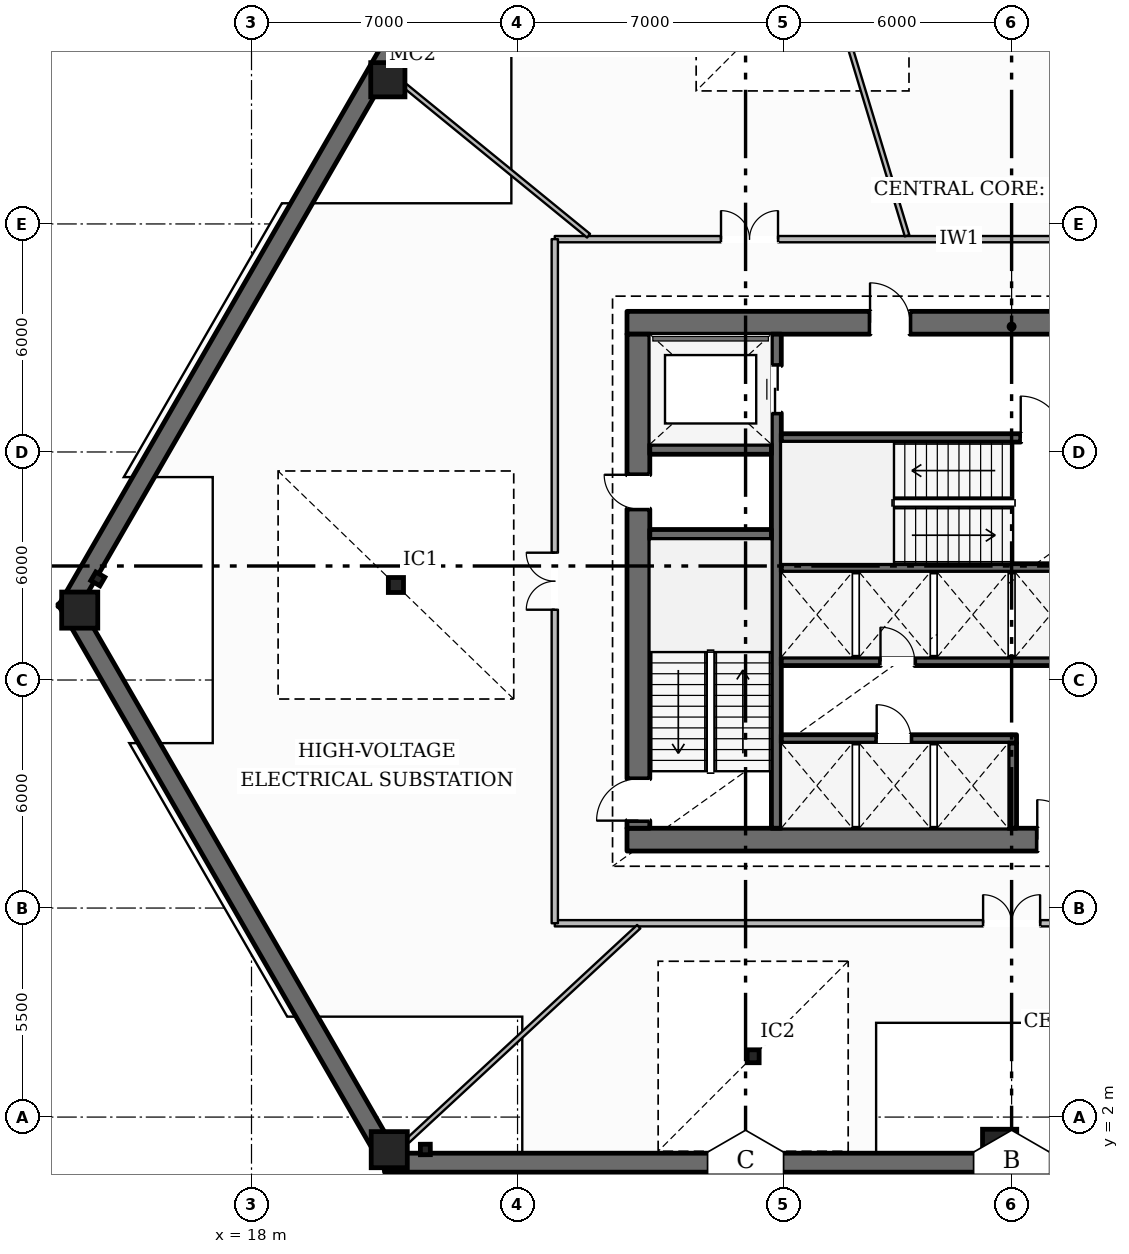
"""IFC4 building model, lengths in metres.
Left out: names, types, materials, properties, quantities, classifications, styles, units other than length and angle.
Written with IfcOpenShell. Run it as: python <this file> out.ifc"""

import sys

from ifc_helpers import new_model, si_unit, direction, frame, frame_2d, origin, origin_2d, place, context, subcontext, project, spatial, rectangle, hollow_rectangle, i_section, extrude, element, fill, save


model = new_model("IFC4")
c1 = context("Model", 3, precision=1e-05, world=origin(), true_north=direction((0.0, 1.0)))
c2 = subcontext(c1, "Body", "Model", "MODEL_VIEW")
j1 = project(units=[si_unit("LENGTHUNIT", "METRE"), si_unit("PLANEANGLEUNIT", "RADIAN")], contexts=[c1])
p1 = place(None, origin())
s1 = spatial("IfcSite", under=j1, at=p1, CompositionType="ELEMENT")
p2 = place(p1, origin())
s2 = spatial("IfcBuilding", under=s1, at=p2, CompositionType="ELEMENT")
p3 = place(p2, frame((0.0, 0.0, -8.4)))
s3 = spatial("IfcBuildingStorey", under=s2, at=p3, CompositionType="ELEMENT", Elevation=-8.4)
p4 = place(p3, frame((29.622, 43.889, 0.0), z_axis=(0.0, 0.0, 1.0), x_axis=(-0.499999749417, -0.866025548458, 0.0)))
e1 = element("IfcWall", 1, at=p4, inside=s3, PredefinedType="SHEAR", context=c2, shape_type="SweptSolid", body=[
    extrude(rectangle(XDim=33.0, YDim=0.5, at=frame_2d((16.5, 0.0))), origin(), (0.0, 0.0, 1.0), 3.95),
])
p5 = place(p3, frame((13.122, 15.618, 0.0), z_axis=(0.0, 0.0, 1.0), x_axis=(0.499998305863, -0.866026381893, 0.0)))
e2 = element("IfcWall", 2, at=p5, inside=s3, PredefinedType="SHEAR", context=c2, shape_type="SweptSolid", body=[
    extrude(rectangle(XDim=17.289, YDim=0.5, at=frame_2d((8.644, 0.0))), origin(), (0.0, 0.0, 1.0), 3.95),
])
p6 = place(p3, frame((21.5, 0.8, 0.0), z_axis=(0.0, 0.0, 1.0), x_axis=(1.0, 0.0, 0.0)))
e3 = element("IfcWall", 3, at=p6, inside=s3, PredefinedType="SHEAR", context=c2, shape_type="SweptSolid", body=[
    extrude(rectangle(XDim=33.0, YDim=0.5, at=frame_2d((16.5, 0.0))), origin(), (0.0, 0.0, 1.0), 3.95),
])
p7 = place(p3, frame((27.88, 9.3, 0.0), z_axis=(0.0, 0.0, 1.0), x_axis=(1.0, 0.0, 0.0)))
e4 = element("IfcWall", 4, at=p7, inside=s3, PredefinedType="SOLIDWALL", context=c2, shape_type="SweptSolid", body=[
    extrude(rectangle(XDim=20.24, YDim=0.6, at=frame_2d((10.12, 0.0))), origin(), (0.0, 0.0, 1.0), 3.95),
])
p8 = place(p7, frame((10.795, 0.0, 0.0)))
e5 = element("IfcOpeningElement", 5, at=p8, cuts=e4, PredefinedType="OPENING", context=c2, shape_type="SweptSolid", body=[
    extrude(rectangle(XDim=1.05, YDim=2.15, at=frame_2d((0.525, 1.075))), frame((0.0, 0.31, 0.0), z_axis=(0.0, -1.0, 0.0), x_axis=(1.0, 0.0, 0.0)), (0.0, 0.0, 1.0), 0.62),
])
p9 = place(p3, frame((27.88, 22.9, 0.0), z_axis=(0.0, 0.0, 1.0), x_axis=(1.0, 0.0, 0.0)))
e6 = element("IfcWall", 6, at=p9, inside=s3, PredefinedType="SOLIDWALL", context=c2, shape_type="SweptSolid", body=[
    extrude(rectangle(XDim=20.24, YDim=0.6, at=frame_2d((10.12, 0.0))), origin(), (0.0, 0.0, 1.0), 3.95),
])
p10 = place(p9, frame((6.395, 0.0, 0.0)))
e7 = element("IfcOpeningElement", 7, at=p10, cuts=e6, PredefinedType="OPENING", context=c2, shape_type="SweptSolid", body=[
    extrude(rectangle(XDim=1.05, YDim=2.15, at=frame_2d((0.525, 1.075))), frame((0.0, 0.31, 0.0), z_axis=(0.0, -1.0, 0.0), x_axis=(1.0, 0.0, 0.0)), (0.0, 0.0, 1.0), 0.62),
])
p11 = place(p9, frame((12.795, 0.0, 0.0)))
e8 = element("IfcOpeningElement", 8, at=p11, cuts=e6, PredefinedType="OPENING", context=c2, shape_type="SweptSolid", body=[
    extrude(rectangle(XDim=1.05, YDim=2.15, at=frame_2d((0.525, 1.075))), frame((0.0, 0.31, 0.0), z_axis=(0.0, -1.0, 0.0), x_axis=(1.0, 0.0, 0.0)), (0.0, 0.0, 1.0), 0.62),
])
p12 = place(p3, frame((28.18, 9.6, 0.0), z_axis=(0.0, 0.0, 1.0), x_axis=(0.0, 1.0, 0.0)))
e9 = element("IfcWall", 9, at=p12, inside=s3, PredefinedType="SOLIDWALL", context=c2, shape_type="SweptSolid", body=[
    extrude(rectangle(XDim=13.0, YDim=0.6, at=frame_2d((6.5, 0.0))), origin(), (0.0, 0.0, 1.0), 3.95),
])
p13 = place(p12, frame((0.2, 0.0, 0.0)))
e10 = element("IfcOpeningElement", 10, at=p13, cuts=e9, PredefinedType="OPENING", context=c2, shape_type="SweptSolid", body=[
    extrude(rectangle(XDim=1.1, YDim=2.15, at=frame_2d((0.55, 1.075))), frame((0.0, 0.31, 0.0), z_axis=(0.0, -1.0, 0.0), x_axis=(1.0, 0.0, 0.0)), (0.0, 0.0, 1.0), 0.62),
])
p14 = place(p12, frame((8.4, 0.0, 0.0)))
e11 = element("IfcOpeningElement", 11, at=p14, cuts=e9, PredefinedType="OPENING", context=c2, shape_type="SweptSolid", body=[
    extrude(rectangle(XDim=0.9, YDim=2.1, at=frame_2d((0.45, 1.05))), frame((0.0, 0.31, 0.0), z_axis=(0.0, -1.0, 0.0), x_axis=(1.0, 0.0, 0.0)), (0.0, 0.0, 1.0), 0.62),
])
p15 = place(p3, frame((31.81, 9.6, 0.0), z_axis=(0.0, 0.0, 1.0), x_axis=(0.0, 1.0, 0.0)))
e12 = element("IfcWall", 12, at=p15, inside=s3, PredefinedType="SHEAR", context=c2, shape_type="SweptSolid", body=[
    extrude(rectangle(XDim=13.0, YDim=0.26, at=frame_2d((6.5, 0.0))), origin(), (0.0, 0.0, 1.0), 3.95),
])
p16 = place(p15, frame((10.925, 0.0, 0.0)))
e13 = element("IfcOpeningElement", 13, at=p16, cuts=e12, PredefinedType="OPENING", context=c2, shape_type="SweptSolid", body=[
    extrude(rectangle(XDim=1.25, YDim=2.25, at=frame_2d((0.625, 1.125))), frame((0.0, 0.14, 0.0), z_axis=(0.0, -1.0, 0.0), x_axis=(1.0, 0.0, 0.0)), (0.0, 0.0, 1.0), 0.28),
])
for number, where, z_axis, x_axis in (
    (14, (28.48, 17.33, 0.0), (0.0, 0.0, 1.0), (1.0, 0.0, 0.0)),
    (15, (28.48, 19.57, 0.0), (0.0, 0.0, 1.0), (1.0, 0.0, 0.0)),
):
    element("IfcWall", number, at=place(p3, frame(where, z_axis=z_axis, x_axis=x_axis)), inside=s3, PredefinedType="SHEAR", context=c2, shape_type="SweptSolid", body=[
        extrude(rectangle(XDim=3.2, YDim=0.26, at=frame_2d((1.6, 0.0))), origin(), (0.0, 0.0, 1.0), 3.95),
    ])
p17 = place(p3, frame((31.94, 19.87, 0.0), z_axis=(0.0, 0.0, 1.0), x_axis=(1.0, 0.0, 0.0)))
e16 = element("IfcWall", 16, at=p17, inside=s3, PredefinedType="SOLIDWALL", context=c2, shape_type="SweptSolid", body=[
    extrude(rectangle(XDim=12.12, YDim=0.22, at=frame_2d((6.06, 0.0))), origin(), (0.0, 0.0, 1.0), 3.95),
])
p18 = place(p17, frame((6.3, 0.0, 0.0)))
e17 = element("IfcOpeningElement", 17, at=p18, cuts=e16, PredefinedType="OPENING", context=c2, shape_type="SweptSolid", body=[
    extrude(rectangle(XDim=1.1, YDim=2.15, at=frame_2d((0.55, 1.075))), frame((0.0, 0.12, 0.0), z_axis=(0.0, -1.0, 0.0), x_axis=(1.0, 0.0, 0.0)), (0.0, 0.0, 1.0), 0.24),
])
p19 = place(p17, frame((8.23, 0.0, 0.0)))
e18 = element("IfcOpeningElement", 18, at=p19, cuts=e16, PredefinedType="OPENING", context=c2, shape_type="SweptSolid", body=[
    extrude(rectangle(XDim=0.9, YDim=2.1, at=frame_2d((0.45, 1.05))), frame((0.0, 0.12, 0.0), z_axis=(0.0, -1.0, 0.0), x_axis=(1.0, 0.0, 0.0)), (0.0, 0.0, 1.0), 0.24),
])
p20 = place(p17, frame((10.45, 0.0, 0.0)))
e19 = element("IfcOpeningElement", 19, at=p20, cuts=e16, PredefinedType="OPENING", context=c2, shape_type="SweptSolid", body=[
    extrude(rectangle(XDim=0.9, YDim=2.1, at=frame_2d((0.45, 1.05))), frame((0.0, 0.12, 0.0), z_axis=(0.0, -1.0, 0.0), x_axis=(1.0, 0.0, 0.0)), (0.0, 0.0, 1.0), 0.24),
])
p21 = place(p3, frame((31.94, 16.45, 0.0), z_axis=(0.0, 0.0, 1.0), x_axis=(1.0, 0.0, 0.0)))
e20 = element("IfcWall", 20, at=p21, inside=s3, PredefinedType="SOLIDWALL", context=c2, shape_type="SweptSolid", body=[
    extrude(rectangle(XDim=12.12, YDim=0.22, at=frame_2d((6.06, 0.0))), origin(), (0.0, 0.0, 1.0), 3.95),
])
p22 = place(p3, frame((31.94, 13.99, 0.0), z_axis=(0.0, 0.0, 1.0), x_axis=(1.0, 0.0, 0.0)))
e21 = element("IfcWall", 21, at=p22, inside=s3, PredefinedType="SOLIDWALL", context=c2, shape_type="SweptSolid", body=[
    extrude(rectangle(XDim=12.12, YDim=0.22, at=frame_2d((6.06, 0.0))), origin(), (0.0, 0.0, 1.0), 3.95),
])
p23 = place(p22, frame((2.61, 0.0, 0.0)))
e22 = element("IfcOpeningElement", 22, at=p23, cuts=e21, PredefinedType="OPENING", context=c2, shape_type="SweptSolid", body=[
    extrude(rectangle(XDim=0.9, YDim=2.1, at=frame_2d((0.45, 1.05))), frame((0.0, 0.12, 0.0), z_axis=(0.0, -1.0, 0.0), x_axis=(1.0, 0.0, 0.0)), (0.0, 0.0, 1.0), 0.24),
])
p24 = place(p3, frame((31.94, 11.95, 0.0), z_axis=(0.0, 0.0, 1.0), x_axis=(1.0, 0.0, 0.0)))
e23 = element("IfcWall", 23, at=p24, inside=s3, PredefinedType="SOLIDWALL", context=c2, shape_type="SweptSolid", body=[
    extrude(rectangle(XDim=6.19, YDim=0.22, at=frame_2d((3.095, 0.0))), origin(), (0.0, 0.0, 1.0), 3.95),
])
p25 = place(p24, frame((2.51, 0.0, 0.0)))
e24 = element("IfcOpeningElement", 24, at=p25, cuts=e23, PredefinedType="OPENING", context=c2, shape_type="SweptSolid", body=[
    extrude(rectangle(XDim=0.9, YDim=2.1, at=frame_2d((0.45, 1.05))), frame((0.0, 0.12, 0.0), z_axis=(0.0, -1.0, 0.0), x_axis=(1.0, 0.0, 0.0)), (0.0, 0.0, 1.0), 0.24),
])
p26 = place(p3, frame((38.02, 9.6, 0.0), z_axis=(0.0, 0.0, 1.0), x_axis=(0.0, 1.0, 0.0)))
e25 = element("IfcWall", 25, at=p26, inside=s3, PredefinedType="SOLIDWALL", context=c2, shape_type="SweptSolid", body=[
    extrude(rectangle(XDim=2.24, YDim=0.22, at=frame_2d((1.12, 0.0))), origin(), (0.0, 0.0, 1.0), 3.95),
])
for number, where, z_axis, x_axis in (
    (26, (13.48, 15.339, 0.0), (0.0, 0.0, 1.0), (1.0, 0.0, 0.0)),
    (27, (21.625, 1.142, 0.0), (0.0, 0.0, 1.0), (1.0, 0.0, 0.0)),
):
    element("IfcColumn", number, at=place(p3, frame(where, z_axis=z_axis, x_axis=x_axis)), inside=s3, PredefinedType="COLUMN", context=c2, shape_type="SweptSolid", body=[
        extrude(hollow_rectangle(XDim=0.95, YDim=0.95, WallThickness=0.04, at=origin_2d()), origin(), (0.0, 0.0, 1.0), 3.95),
    ])
for number, where, z_axis, x_axis in (
    (28, (21.587, 29.294, 0.0), (0.0, 0.0, 1.0), (1.0, 0.0, 0.0)),
    (29, (37.685, 1.23, 0.0), (0.0, 0.0, 1.0), (1.0, 0.0, 0.0)),
):
    element("IfcColumn", number, at=place(p3, frame(where, z_axis=z_axis, x_axis=x_axis)), inside=s3, PredefinedType="COLUMN", context=c2, shape_type="SweptSolid", body=[
        extrude(hollow_rectangle(XDim=0.9, YDim=0.9, WallThickness=0.038, at=origin_2d()), origin(), (0.0, 0.0, 1.0), 3.95),
    ])
for number, where, z_axis, x_axis in (
    (30, (13.957, 16.161, 0.0), (0.0, 0.0, 1.0), (-0.502, -0.865, 0.0)),
    (31, (22.574, 1.148, 0.0), (0.0, 0.0, 1.0), (1.0, 0.005, 0.0)),
):
    element("IfcColumn", number, at=place(p3, frame(where, z_axis=z_axis, x_axis=x_axis)), inside=s3, PredefinedType="PILASTER", context=c2, shape_type="SweptSolid", body=[
        extrude(i_section(OverallWidth=0.261, OverallDepth=0.276, WebThickness=0.015, FlangeThickness=0.025, at=origin_2d()), origin(), (0.0, 0.0, 1.0), 3.95),
    ])
p27 = place(p3, frame((21.8, 16.0, 0.0), z_axis=(0.0, 0.0, 1.0), x_axis=(1.0, 0.0, 0.0)))
e32 = element("IfcColumn", 32, at=p27, inside=s3, PredefinedType="COLUMN", context=c2, shape_type="SweptSolid", body=[
    extrude(i_section(OverallWidth=0.399, OverallDepth=0.394, WebThickness=0.023, FlangeThickness=0.037, at=origin_2d()), origin(), (0.0, 0.0, 1.0), 3.95),
])
p28 = place(p3, frame((31.2, 3.6, 0.0), z_axis=(0.0, 0.0, 1.0), x_axis=(1.0, 0.0, 0.0)))
e33 = element("IfcColumn", 33, at=p28, inside=s3, PredefinedType="COLUMN", context=c2, shape_type="SweptSolid", body=[
    extrude(i_section(OverallWidth=0.314, OverallDepth=0.34, WebThickness=0.019, FlangeThickness=0.031, at=origin_2d()), origin(), (0.0, 0.0, 1.0), 3.95),
])
p29 = place(p3, frame((25.98, 25.1, 0.0), z_axis=(0.0, 0.0, 1.0), x_axis=(1.0, 0.0, 0.0)))
e34 = element("IfcWall", 34, at=p29, inside=s3, PredefinedType="PARTITIONING", context=c2, shape_type="SweptSolid", body=[
    extrude(rectangle(XDim=24.04, YDim=0.165, at=frame_2d((12.02, 0.0))), origin(), (0.0, 0.0, 1.0), 3.95),
])
p30 = place(p29, frame((15.415, 0.0, 0.0)))
e35 = element("IfcOpeningElement", 35, at=p30, cuts=e34, PredefinedType="OPENING", context=c2, shape_type="SweptSolid", body=[
    extrude(rectangle(XDim=1.5, YDim=2.25, at=frame_2d((0.75, 1.125))), frame((0.0, 0.093, 0.0), z_axis=(0.0, -1.0, 0.0), x_axis=(1.0, 0.0, 0.0)), (0.0, 0.0, 1.0), 0.185),
])
p31 = place(p29, frame((4.374, 0.0, 0.0)))
e36 = element("IfcOpeningElement", 36, at=p31, cuts=e34, PredefinedType="OPENING", context=c2, shape_type="SweptSolid", body=[
    extrude(rectangle(XDim=1.5, YDim=2.25, at=frame_2d((0.75, 1.125))), frame((0.0, 0.093, 0.0), z_axis=(0.0, -1.0, 0.0), x_axis=(1.0, 0.0, 0.0)), (0.0, 0.0, 1.0), 0.185),
])
p32 = place(p3, frame((25.98, 7.1, 0.0), z_axis=(0.0, 0.0, 1.0), x_axis=(1.0, 0.0, 0.0)))
e37 = element("IfcWall", 37, at=p32, inside=s3, PredefinedType="PARTITIONING", context=c2, shape_type="SweptSolid", body=[
    extrude(rectangle(XDim=24.04, YDim=0.165, at=frame_2d((12.02, 0.0))), origin(), (0.0, 0.0, 1.0), 3.95),
])
p33 = place(p32, frame((11.27, 0.0, 0.0)))
e38 = element("IfcOpeningElement", 38, at=p33, cuts=e37, PredefinedType="OPENING", context=c2, shape_type="SweptSolid", body=[
    extrude(rectangle(XDim=1.5, YDim=2.25, at=frame_2d((0.75, 1.125))), frame((0.0, 0.093, 0.0), z_axis=(0.0, -1.0, 0.0), x_axis=(1.0, 0.0, 0.0)), (0.0, 0.0, 1.0), 0.185),
])
p34 = place(p3, frame((25.98, 7.1, 0.0), z_axis=(0.0, 0.0, 1.0), x_axis=(0.0, 1.0, 0.0)))
e39 = element("IfcWall", 39, at=p34, inside=s3, PredefinedType="PARTITIONING", context=c2, shape_type="SweptSolid", body=[
    extrude(rectangle(XDim=18.0, YDim=0.165, at=frame_2d((9.0, 0.0))), origin(), (0.0, 0.0, 1.0), 3.95),
])
p35 = place(p34, frame((8.25, 0.0, 0.0)))
e40 = element("IfcOpeningElement", 40, at=p35, cuts=e39, PredefinedType="OPENING", context=c2, shape_type="SweptSolid", body=[
    extrude(rectangle(XDim=1.5, YDim=2.25, at=frame_2d((0.75, 1.125))), frame((0.0, 0.093, 0.0), z_axis=(0.0, -1.0, 0.0), x_axis=(1.0, 0.0, 0.0)), (0.0, 0.0, 1.0), 0.185),
])
p36 = place(p3, frame((35.249, 25.19, 0.0), z_axis=(0.0, 0.0, 1.0), x_axis=(-0.289619538285, 0.957141851057, 0.0)))
e41 = element("IfcWall", 41, at=p36, inside=s3, PredefinedType="PARTITIONING", context=c2, shape_type="SweptSolid", body=[
    extrude(rectangle(XDim=18.362, YDim=0.125, at=frame_2d((9.181, 0.0))), origin(), (0.0, 0.0, 1.0), 3.95),
])
p37 = place(p3, frame((26.868, 25.19, 0.0), z_axis=(0.0, 0.0, 1.0), x_axis=(-0.774552615405, 0.632509482908, 0.0)))
e42 = element("IfcWall", 42, at=p37, inside=s3, PredefinedType="PARTITIONING", context=c2, shape_type="SweptSolid", body=[
    extrude(rectangle(XDim=6.227, YDim=0.125, at=frame_2d((3.114, 0.0))), origin(), (0.0, 0.0, 1.0), 3.95),
])
p38 = place(p3, frame((28.189, 7.01, 0.0), z_axis=(0.0, 0.0, 1.0), x_axis=(-0.733538790589, -0.679647587137, 0.0)))
e43 = element("IfcWall", 43, at=p38, inside=s3, PredefinedType="PARTITIONING", context=c2, shape_type="SweptSolid", body=[
    extrude(rectangle(XDim=8.29, YDim=0.125, at=frame_2d((4.145, 0.0))), origin(), (0.0, 0.0, 1.0), 3.95),
])
p39 = place(p13, origin())
e44 = element("IfcDoor", 44, at=p39, inside=s3, OperationType="SINGLE_SWING_LEFT", PredefinedType="DOOR", context=c2, shape_type="SweptSolid", body=[
    extrude(rectangle(XDim=1.1, YDim=2.15, at=frame_2d((0.55, 1.075))), frame((0.0, 0.025, 0.0), z_axis=(0.0, -1.0, 0.0), x_axis=(1.0, 0.0, 0.0)), (0.0, 0.0, 1.0), 0.05),
])
fill(e10, e44)
p40 = place(p18, origin())
e45 = element("IfcDoor", 45, at=p40, inside=s3, OperationType="SINGLE_SWING_LEFT", PredefinedType="DOOR", context=c2, shape_type="SweptSolid", body=[
    extrude(rectangle(XDim=1.1, YDim=2.15, at=frame_2d((0.55, 1.075))), frame((0.0, 0.025, 0.0), z_axis=(0.0, -1.0, 0.0), x_axis=(1.0, 0.0, 0.0)), (0.0, 0.0, 1.0), 0.05),
])
fill(e17, e45)
p41 = place(p14, origin())
e46 = element("IfcDoor", 46, at=p41, inside=s3, OperationType="SINGLE_SWING_RIGHT", PredefinedType="DOOR", context=c2, shape_type="SweptSolid", body=[
    extrude(rectangle(XDim=0.9, YDim=2.1, at=frame_2d((0.45, 1.05))), frame((0.0, 0.025, 0.0), z_axis=(0.0, -1.0, 0.0), x_axis=(1.0, 0.0, 0.0)), (0.0, 0.0, 1.0), 0.05),
])
fill(e11, e46)
p42 = place(p10, origin())
e47 = element("IfcDoor", 47, at=p42, inside=s3, OperationType="SINGLE_SWING_LEFT", PredefinedType="DOOR", context=c2, shape_type="SweptSolid", body=[
    extrude(rectangle(XDim=1.05, YDim=2.15, at=frame_2d((0.525, 1.075))), frame((0.0, 0.025, 0.0), z_axis=(0.0, -1.0, 0.0), x_axis=(1.0, 0.0, 0.0)), (0.0, 0.0, 1.0), 0.05),
])
fill(e7, e47)
p43 = place(p16, origin())
e48 = element("IfcDoor", 48, at=p43, inside=s3, OperationType="DOUBLE_DOOR_SLIDING", PredefinedType="DOOR", context=c2, shape_type="SweptSolid", body=[
    extrude(rectangle(XDim=1.25, YDim=2.25, at=frame_2d((0.625, 1.125))), frame((0.0, 0.025, 0.0), z_axis=(0.0, -1.0, 0.0), x_axis=(1.0, 0.0, 0.0)), (0.0, 0.0, 1.0), 0.05),
])
fill(e13, e48)
p44 = place(p8, origin())
e49 = element("IfcDoor", 49, at=p44, inside=s3, OperationType="SINGLE_SWING_LEFT", PredefinedType="DOOR", context=c2, shape_type="SweptSolid", body=[
    extrude(rectangle(XDim=1.05, YDim=2.15, at=frame_2d((0.525, 1.075))), frame((0.0, 0.025, 0.0), z_axis=(0.0, -1.0, 0.0), x_axis=(1.0, 0.0, 0.0)), (0.0, 0.0, 1.0), 0.05),
])
fill(e5, e49)
p45 = place(p25, origin())
e50 = element("IfcDoor", 50, at=p45, inside=s3, OperationType="SINGLE_SWING_LEFT", PredefinedType="DOOR", context=c2, shape_type="SweptSolid", body=[
    extrude(rectangle(XDim=0.9, YDim=2.1, at=frame_2d((0.45, 1.05))), frame((0.0, 0.025, 0.0), z_axis=(0.0, -1.0, 0.0), x_axis=(1.0, 0.0, 0.0)), (0.0, 0.0, 1.0), 0.05),
])
fill(e24, e50)
p46 = place(p23, origin())
e51 = element("IfcDoor", 51, at=p46, inside=s3, OperationType="SINGLE_SWING_LEFT", PredefinedType="DOOR", context=c2, shape_type="SweptSolid", body=[
    extrude(rectangle(XDim=0.9, YDim=2.1, at=frame_2d((0.45, 1.05))), frame((0.0, 0.025, 0.0), z_axis=(0.0, -1.0, 0.0), x_axis=(1.0, 0.0, 0.0)), (0.0, 0.0, 1.0), 0.05),
])
fill(e22, e51)
p47 = place(p31, origin())
e52 = element("IfcDoor", 52, at=p47, inside=s3, OperationType="DOUBLE_DOOR_SINGLE_SWING", PredefinedType="DOOR", context=c2, shape_type="SweptSolid", body=[
    extrude(rectangle(XDim=1.5, YDim=2.25, at=frame_2d((0.75, 1.125))), frame((0.0, 0.025, 0.0), z_axis=(0.0, -1.0, 0.0), x_axis=(1.0, 0.0, 0.0)), (0.0, 0.0, 1.0), 0.05),
])
fill(e36, e52)
p48 = place(p35, origin())
e53 = element("IfcDoor", 53, at=p48, inside=s3, OperationType="DOUBLE_DOOR_SINGLE_SWING", PredefinedType="DOOR", context=c2, shape_type="SweptSolid", body=[
    extrude(rectangle(XDim=1.5, YDim=2.25, at=frame_2d((0.75, 1.125))), frame((0.0, 0.025, 0.0), z_axis=(0.0, -1.0, 0.0), x_axis=(1.0, 0.0, 0.0)), (0.0, 0.0, 1.0), 0.05),
])
fill(e40, e53)
p49 = place(p33, origin())
e54 = element("IfcDoor", 54, at=p49, inside=s3, OperationType="DOUBLE_DOOR_SINGLE_SWING", PredefinedType="DOOR", context=c2, shape_type="SweptSolid", body=[
    extrude(rectangle(XDim=1.5, YDim=2.25, at=frame_2d((0.75, 1.125))), frame((0.0, 0.025, 0.0), z_axis=(0.0, -1.0, 0.0), x_axis=(1.0, 0.0, 0.0)), (0.0, 0.0, 1.0), 0.05),
])
fill(e38, e54)
save(model, sys.argv[1])
